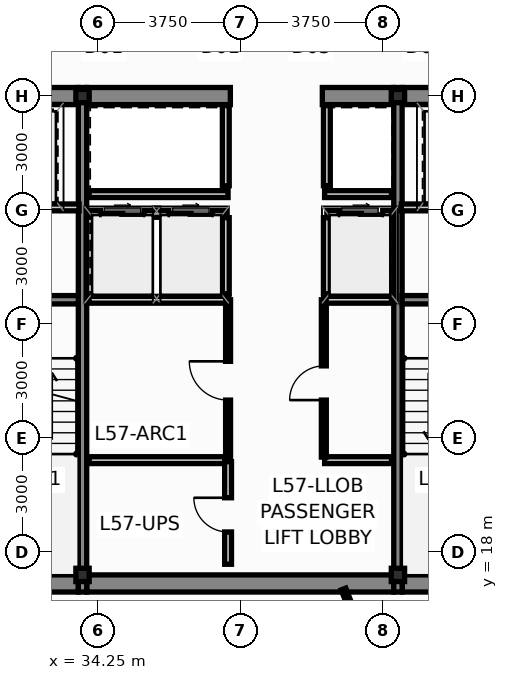
"""IFC4 building model, lengths in metres.
Left out: names, types, materials, properties, quantities, classifications, styles, units other than length and angle.
Written with IfcOpenShell. Run it as: python <this file> out.ifc"""

import sys

from ifc_helpers import new_model, si_unit, direction, frame, frame_2d, origin, origin_2d, place, context, subcontext, project, spatial, rectangle, hollow_rectangle, extrude, source, transform, mapped, element, fill, save


model = new_model("IFC4")
c1 = context("Model", 3, precision=1e-05, world=origin(), true_north=direction((0.0, 1.0)))
c2 = subcontext(c1, "Body", "Model", "MODEL_VIEW")
j1 = project(units=[si_unit("LENGTHUNIT", "METRE"), si_unit("PLANEANGLEUNIT", "RADIAN")], contexts=[c1])
p1 = place(None, origin())
s1 = spatial("IfcSite", under=j1, at=p1, CompositionType="ELEMENT")
p2 = place(p1, origin())
s2 = spatial("IfcBuilding", under=s1, at=p2, CompositionType="ELEMENT")
p3 = place(p2, frame((0.0, 0.0, 216.9)))
s3 = spatial("IfcBuildingStorey", under=s2, at=p3, CompositionType="ELEMENT", Elevation=216.9)
m1 = source(origin(), c2, "Body", "SweptSolid", [
    extrude(hollow_rectangle(XDim=0.35, YDim=0.35, WallThickness=0.016, at=origin_2d()), origin(), (0.0, 0.0, 1.0), 3.65),
])
for number, where, z_axis, x_axis in (
    (1, (33.85, 17.4, 0.0), (0.0, 0.0, 1.0), (1.0, 0.0, 0.0)),
    (2, (42.15, 17.4, 0.0), (0.0, 0.0, 1.0), (1.0, 0.0, 0.0)),
    (3, (33.85, 30.0, 0.0), (0.0, 0.0, 1.0), (1.0, 0.0, 0.0)),
    (4, (42.15, 30.0, 0.0), (0.0, 0.0, 1.0), (1.0, 0.0, 0.0)),
):
    element("IfcColumn", number, at=place(p3, frame(where, z_axis=z_axis, x_axis=x_axis)), inside=s3, PredefinedType="COLUMN", context=c2, shape_type="MappedRepresentation", body=[
        mapped(m1, transform((0.0, 0.0, 0.0), scale=1.0)),
    ])
p4 = place(p3, frame((30.84, 17.175, 0.0), z_axis=(0.0, 0.0, 1.0), x_axis=(1.0, 0.0, 0.0)))
e5 = element("IfcWall", 5, at=p4, inside=s3, PredefinedType="SHEAR", context=c2, shape_type="SweptSolid", body=[
    extrude(rectangle(XDim=2.9, YDim=0.45, at=frame_2d((1.45, 0.0))), origin(), (0.0, 0.0, 1.0), 3.65),
])
p5 = place(p3, frame((33.96, 17.175, 0.0), z_axis=(0.0, 0.0, 1.0), x_axis=(1.0, 0.0, 0.0)))
e6 = element("IfcWall", 6, at=p5, inside=s3, PredefinedType="SHEAR", context=c2, shape_type="SweptSolid", body=[
    extrude(rectangle(XDim=8.08, YDim=0.45, at=frame_2d((4.04, 0.0))), origin(), (0.0, 0.0, 1.0), 3.65),
])
for number, where, z_axis, x_axis in (
    (7, (42.26, 17.175, 0.0), (0.0, 0.0, 1.0), (1.0, 0.0, 0.0)),
    (8, (30.84, 30.0, 0.0), (0.0, 0.0, 1.0), (1.0, 0.0, 0.0)),
):
    element("IfcWall", number, at=place(p3, frame(where, z_axis=z_axis, x_axis=x_axis)), inside=s3, PredefinedType="SHEAR", context=c2, shape_type="SweptSolid", body=[
        extrude(rectangle(XDim=2.9, YDim=0.45, at=frame_2d((1.45, 0.0))), origin(), (0.0, 0.0, 1.0), 3.65),
    ])
p6 = place(p3, frame((33.96, 30.0, 0.0), z_axis=(0.0, 0.0, 1.0), x_axis=(1.0, 0.0, 0.0)))
e9 = element("IfcWall", 9, at=p6, inside=s3, PredefinedType="SHEAR", context=c2, shape_type="SweptSolid", body=[
    extrude(rectangle(XDim=3.78, YDim=0.45, at=frame_2d((1.89, 0.0))), origin(), (0.0, 0.0, 1.0), 3.65),
])
p7 = place(p3, frame((40.16, 30.0, 0.0), z_axis=(0.0, 0.0, 1.0), x_axis=(1.0, 0.0, 0.0)))
e10 = element("IfcWall", 10, at=p7, inside=s3, PredefinedType="SHEAR", context=c2, shape_type="SweptSolid", body=[
    extrude(rectangle(XDim=1.88, YDim=0.45, at=frame_2d((0.94, 0.0))), origin(), (0.0, 0.0, 1.0), 3.65),
])
p8 = place(p3, frame((42.26, 30.0, 0.0), z_axis=(0.0, 0.0, 1.0), x_axis=(1.0, 0.0, 0.0)))
e11 = element("IfcWall", 11, at=p8, inside=s3, PredefinedType="SHEAR", context=c2, shape_type="SweptSolid", body=[
    extrude(rectangle(XDim=2.9, YDim=0.45, at=frame_2d((1.45, 0.0))), origin(), (0.0, 0.0, 1.0), 3.65),
])
for number, where, z_axis, x_axis in (
    (12, (33.85, 16.95, 0.0), (0.0, 0.0, 1.0), (0.0, 1.0, 0.0)),
    (13, (42.15, 16.95, 0.0), (0.0, 0.0, 1.0), (0.0, 1.0, 0.0)),
):
    element("IfcWall", number, at=place(p3, frame(where, z_axis=z_axis, x_axis=x_axis)), inside=s3, PredefinedType="SHEAR", context=c2, shape_type="SweptSolid", body=[
        extrude(rectangle(XDim=13.275, YDim=0.22, at=frame_2d((6.638, 0.0))), origin(), (0.0, 0.0, 1.0), 3.65),
    ])
for number, where, z_axis, x_axis in (
    (14, (30.84, 24.64, 0.0), (0.0, 0.0, 1.0), (1.0, 0.0, 0.0)),
    (15, (42.26, 24.64, 0.0), (0.0, 0.0, 1.0), (1.0, 0.0, 0.0)),
):
    element("IfcWall", number, at=place(p3, frame(where, z_axis=z_axis, x_axis=x_axis)), inside=s3, PredefinedType="SHEAR", context=c2, shape_type="SweptSolid", body=[
        extrude(rectangle(XDim=2.9, YDim=0.22, at=frame_2d((1.45, 0.0))), origin(), (0.0, 0.0, 1.0), 3.65),
    ])
p9 = place(p3, frame((34.02, 26.9, 0.0), z_axis=(0.0, 0.0, 1.0), x_axis=(1.0, 0.0, 0.0)))
e16 = element("IfcWall", 16, at=p9, inside=s3, PredefinedType="PARTITIONING", context=c2, shape_type="SweptSolid", body=[
    extrude(rectangle(XDim=3.6, YDim=0.18, at=frame_2d((1.8, 0.0))), origin(), (0.0, 0.0, 1.0), 3.25),
])
p10 = place(p9, frame((0.3, 0.0, 0.0)))
e17 = element("IfcOpeningElement", 17, at=p10, cuts=e16, PredefinedType="OPENING", context=c2, shape_type="SweptSolid", body=[
    extrude(rectangle(XDim=1.15, YDim=2.2, at=frame_2d((0.575, 1.1))), frame((0.0, 0.102, 0.0), z_axis=(0.0, -1.0, 0.0), x_axis=(1.0, 0.0, 0.0)), (0.0, 0.0, 1.0), 0.204),
])
p11 = place(p9, frame((2.1, 0.0, 0.0)))
e18 = element("IfcOpeningElement", 18, at=p11, cuts=e16, PredefinedType="OPENING", context=c2, shape_type="SweptSolid", body=[
    extrude(rectangle(XDim=1.15, YDim=2.2, at=frame_2d((0.575, 1.1))), frame((0.0, 0.102, 0.0), z_axis=(0.0, -1.0, 0.0), x_axis=(1.0, 0.0, 0.0)), (0.0, 0.0, 1.0), 0.204),
])
p12 = place(p3, frame((40.28, 26.9, 0.0), z_axis=(0.0, 0.0, 1.0), x_axis=(1.0, 0.0, 0.0)))
e19 = element("IfcWall", 19, at=p12, inside=s3, PredefinedType="PARTITIONING", context=c2, shape_type="SweptSolid", body=[
    extrude(rectangle(XDim=1.7, YDim=0.18, at=frame_2d((0.85, 0.0))), origin(), (0.0, 0.0, 1.0), 3.25),
])
p13 = place(p12, frame((0.32, 0.0, 0.0)))
e20 = element("IfcOpeningElement", 20, at=p13, cuts=e19, PredefinedType="OPENING", context=c2, shape_type="SweptSolid", body=[
    extrude(rectangle(XDim=1.15, YDim=2.2, at=frame_2d((0.575, 1.1))), frame((0.0, 0.102, 0.0), z_axis=(0.0, -1.0, 0.0), x_axis=(1.0, 0.0, 0.0)), (0.0, 0.0, 1.0), 0.204),
])
for number, where, z_axis, x_axis in (
    (21, (37.62, 24.8, 0.0), (0.0, 0.0, 1.0), (0.0, 1.0, 0.0)),
    (22, (40.28, 24.8, 0.0), (0.0, 0.0, 1.0), (0.0, 1.0, 0.0)),
):
    element("IfcWall", number, at=place(p3, frame(where, z_axis=z_axis, x_axis=x_axis)), inside=s3, PredefinedType="PARTITIONING", context=c2, shape_type="SweptSolid", body=[
        extrude(rectangle(XDim=2.0, YDim=0.18, at=frame_2d((1.0, 0.0))), origin(), (0.0, 0.0, 1.0), 3.25),
    ])
p14 = place(p3, frame((34.02, 24.64, 0.0), z_axis=(0.0, 0.0, 1.0), x_axis=(1.0, 0.0, 0.0)))
e23 = element("IfcWall", 23, at=p14, inside=s3, PredefinedType="PARTITIONING", context=c2, shape_type="SweptSolid", body=[
    extrude(rectangle(XDim=3.68, YDim=0.18, at=frame_2d((1.84, 0.0))), origin(), (0.0, 0.0, 1.0), 3.25),
])
p15 = place(p3, frame((40.2, 24.64, 0.0), z_axis=(0.0, 0.0, 1.0), x_axis=(1.0, 0.0, 0.0)))
e24 = element("IfcWall", 24, at=p15, inside=s3, PredefinedType="PARTITIONING", context=c2, shape_type="SweptSolid", body=[
    extrude(rectangle(XDim=1.78, YDim=0.18, at=frame_2d((0.89, 0.0))), origin(), (0.0, 0.0, 1.0), 3.25),
])
p16 = place(p3, frame((34.02, 27.42, 0.0), z_axis=(0.0, 0.0, 1.0), x_axis=(1.0, 0.0, 0.0)))
e25 = element("IfcWall", 25, at=p16, inside=s3, PredefinedType="PARTITIONING", context=c2, shape_type="SweptSolid", body=[
    extrude(rectangle(XDim=3.66, YDim=0.18, at=frame_2d((1.83, 0.0))), origin(), (0.0, 0.0, 1.0), 3.25),
])
p17 = place(p3, frame((40.22, 27.42, 0.0), z_axis=(0.0, 0.0, 1.0), x_axis=(1.0, 0.0, 0.0)))
e26 = element("IfcWall", 26, at=p17, inside=s3, PredefinedType="PARTITIONING", context=c2, shape_type="SweptSolid", body=[
    extrude(rectangle(XDim=1.76, YDim=0.18, at=frame_2d((0.88, 0.0))), origin(), (0.0, 0.0, 1.0), 3.25),
])
for number, where, z_axis, x_axis in (
    (27, (37.62, 27.64, 0.0), (0.0, 0.0, 1.0), (0.0, 1.0, 0.0)),
    (28, (40.28, 27.64, 0.0), (0.0, 0.0, 1.0), (0.0, 1.0, 0.0)),
):
    element("IfcWall", number, at=place(p3, frame(where, z_axis=z_axis, x_axis=x_axis)), inside=s3, PredefinedType="PARTITIONING", context=c2, shape_type="SweptSolid", body=[
        extrude(rectangle(XDim=2.11, YDim=0.18, at=frame_2d((1.055, 0.0))), origin(), (0.0, 0.0, 1.0), 3.25),
    ])
for number, where, z_axis, x_axis in (
    (29, (30.86, 27.07, 0.0), (0.0, 0.0, 1.0), (1.0, 0.0, 0.0)),
    (30, (42.24, 27.07, 0.0), (0.0, 0.0, 1.0), (1.0, 0.0, 0.0)),
):
    element("IfcWall", number, at=place(p3, frame(where, z_axis=z_axis, x_axis=x_axis)), inside=s3, PredefinedType="PARTITIONING", context=c2, shape_type="SweptSolid", body=[
        extrude(rectangle(XDim=2.9, YDim=0.18, at=frame_2d((1.45, 0.0))), origin(), (0.0, 0.0, 1.0), 3.25),
    ])
p18 = place(p3, frame((34.02, 20.42, 0.0), z_axis=(0.0, 0.0, 1.0), x_axis=(1.0, 0.0, 0.0)))
e31 = element("IfcWall", 31, at=p18, inside=s3, PredefinedType="PARTITIONING", context=c2, shape_type="SweptSolid", body=[
    extrude(rectangle(XDim=3.64, YDim=0.18, at=frame_2d((1.82, 0.0))), origin(), (0.0, 0.0, 1.0), 3.25),
])
p19 = place(p3, frame((40.22, 20.42, 0.0), z_axis=(0.0, 0.0, 1.0), x_axis=(1.0, 0.0, 0.0)))
e32 = element("IfcWall", 32, at=p19, inside=s3, PredefinedType="PARTITIONING", context=c2, shape_type="SweptSolid", body=[
    extrude(rectangle(XDim=1.76, YDim=0.18, at=frame_2d((0.88, 0.0))), origin(), (0.0, 0.0, 1.0), 3.25),
])
p20 = place(p3, frame((37.68, 20.5, 0.0), z_axis=(0.0, 0.0, 1.0), x_axis=(0.0, 1.0, 0.0)))
e33 = element("IfcWall", 33, at=p20, inside=s3, PredefinedType="PARTITIONING", context=c2, shape_type="SweptSolid", body=[
    extrude(rectangle(XDim=4.14, YDim=0.13, at=frame_2d((2.07, 0.0))), origin(), (0.0, 0.0, 1.0), 3.25),
])
p21 = place(p20, frame((1.5, 0.0, 0.0)))
e34 = element("IfcOpeningElement", 34, at=p21, cuts=e33, PredefinedType="OPENING", context=c2, shape_type="SweptSolid", body=[
    extrude(rectangle(XDim=1.02, YDim=2.15, at=frame_2d((0.51, 1.075))), frame((0.0, 0.077, 0.0), z_axis=(0.0, -1.0, 0.0), x_axis=(1.0, 0.0, 0.0)), (0.0, 0.0, 1.0), 0.154),
])
p22 = place(p3, frame((40.2, 20.5, 0.0), z_axis=(0.0, 0.0, 1.0), x_axis=(0.0, 1.0, 0.0)))
e35 = element("IfcWall", 35, at=p22, inside=s3, PredefinedType="PARTITIONING", context=c2, shape_type="SweptSolid", body=[
    extrude(rectangle(XDim=4.14, YDim=0.13, at=frame_2d((2.07, 0.0))), origin(), (0.0, 0.0, 1.0), 3.25),
])
p23 = place(p22, frame((1.5, 0.0, 0.0)))
e36 = element("IfcOpeningElement", 36, at=p23, cuts=e35, PredefinedType="OPENING", context=c2, shape_type="SweptSolid", body=[
    extrude(rectangle(XDim=0.9, YDim=2.1, at=frame_2d((0.45, 1.05))), frame((0.0, 0.077, 0.0), z_axis=(0.0, -1.0, 0.0), x_axis=(1.0, 0.0, 0.0)), (0.0, 0.0, 1.0), 0.154),
])
p24 = place(p3, frame((37.68, 17.68, 0.0), z_axis=(0.0, 0.0, 1.0), x_axis=(0.0, 1.0, 0.0)))
e37 = element("IfcWall", 37, at=p24, inside=s3, PredefinedType="PARTITIONING", context=c2, shape_type="SweptSolid", body=[
    extrude(rectangle(XDim=2.7, YDim=0.18, at=frame_2d((1.35, 0.0))), origin(), (0.0, 0.0, 1.0), 3.25),
])
p25 = place(p24, frame((0.85, 0.0, 0.0)))
e38 = element("IfcOpeningElement", 38, at=p25, cuts=e37, PredefinedType="OPENING", context=c2, shape_type="SweptSolid", body=[
    extrude(rectangle(XDim=0.9, YDim=2.1, at=frame_2d((0.45, 1.05))), frame((0.0, 0.102, 0.0), z_axis=(0.0, -1.0, 0.0), x_axis=(1.0, 0.0, 0.0)), (0.0, 0.0, 1.0), 0.204),
])
p26 = place(p3, frame((40.717, 17.03, 0.0), z_axis=(0.0, 0.0, 1.0), x_axis=(0.364181949897, -0.931327819497, 0.0)))
e39 = element("IfcWall", 39, at=p26, inside=s3, PredefinedType="PARTITIONING", context=c2, shape_type="SweptSolid", body=[
    extrude(rectangle(XDim=5.632, YDim=0.13, at=frame_2d((2.816, 0.0))), origin(), (0.0, 0.0, 1.0), 3.25),
])
p27 = place(p26, frame((2.336, 0.0, 0.0)))
e40 = element("IfcOpeningElement", 40, at=p27, cuts=e39, PredefinedType="OPENING", context=c2, shape_type="SweptSolid", body=[
    extrude(rectangle(XDim=0.96, YDim=2.15, at=frame_2d((0.48, 1.075))), frame((0.0, 0.077, 0.0), z_axis=(0.0, -1.0, 0.0), x_axis=(1.0, 0.0, 0.0)), (0.0, 0.0, 1.0), 0.154),
])
p28 = place(p10, origin())
e41 = element("IfcDoor", 41, at=p28, inside=s3, OperationType="SLIDING_TO_LEFT", PredefinedType="DOOR", context=c2, shape_type="SweptSolid", body=[
    extrude(rectangle(XDim=1.15, YDim=2.2, at=frame_2d((0.575, 1.1))), frame((0.0, 0.025, 0.0), z_axis=(0.0, -1.0, 0.0), x_axis=(1.0, 0.0, 0.0)), (0.0, 0.0, 1.0), 0.05),
])
fill(e17, e41)
p29 = place(p11, origin())
e42 = element("IfcDoor", 42, at=p29, inside=s3, OperationType="SLIDING_TO_RIGHT", PredefinedType="DOOR", context=c2, shape_type="SweptSolid", body=[
    extrude(rectangle(XDim=1.15, YDim=2.2, at=frame_2d((0.575, 1.1))), frame((0.0, 0.025, 0.0), z_axis=(0.0, -1.0, 0.0), x_axis=(1.0, 0.0, 0.0)), (0.0, 0.0, 1.0), 0.05),
])
fill(e18, e42)
p30 = place(p13, origin())
e43 = element("IfcDoor", 43, at=p30, inside=s3, OperationType="SLIDING_TO_LEFT", PredefinedType="DOOR", context=c2, shape_type="SweptSolid", body=[
    extrude(rectangle(XDim=1.15, YDim=2.2, at=frame_2d((0.575, 1.1))), frame((0.0, 0.025, 0.0), z_axis=(0.0, -1.0, 0.0), x_axis=(1.0, 0.0, 0.0)), (0.0, 0.0, 1.0), 0.05),
])
fill(e20, e43)
p31 = place(p21, origin())
e44 = element("IfcDoor", 44, at=p31, inside=s3, OperationType="SINGLE_SWING_RIGHT", PredefinedType="DOOR", context=c2, shape_type="SweptSolid", body=[
    extrude(rectangle(XDim=1.02, YDim=2.15, at=frame_2d((0.51, 1.075))), frame((0.0, 0.025, 0.0), z_axis=(0.0, -1.0, 0.0), x_axis=(1.0, 0.0, 0.0)), (0.0, 0.0, 1.0), 0.05),
])
fill(e34, e44)
p32 = place(p23, origin())
e45 = element("IfcDoor", 45, at=p32, inside=s3, OperationType="SINGLE_SWING_LEFT", PredefinedType="DOOR", context=c2, shape_type="SweptSolid", body=[
    extrude(rectangle(XDim=0.9, YDim=2.1, at=frame_2d((0.45, 1.05))), frame((0.0, 0.025, 0.0), z_axis=(0.0, -1.0, 0.0), x_axis=(1.0, 0.0, 0.0)), (0.0, 0.0, 1.0), 0.05),
])
fill(e36, e45)
p33 = place(p25, origin())
e46 = element("IfcDoor", 46, at=p33, inside=s3, OperationType="SINGLE_SWING_RIGHT", PredefinedType="DOOR", context=c2, shape_type="SweptSolid", body=[
    extrude(rectangle(XDim=0.9, YDim=2.1, at=frame_2d((0.45, 1.05))), frame((0.0, 0.025, 0.0), z_axis=(0.0, -1.0, 0.0), x_axis=(1.0, 0.0, 0.0)), (0.0, 0.0, 1.0), 0.05),
])
fill(e38, e46)
save(model, sys.argv[1])
